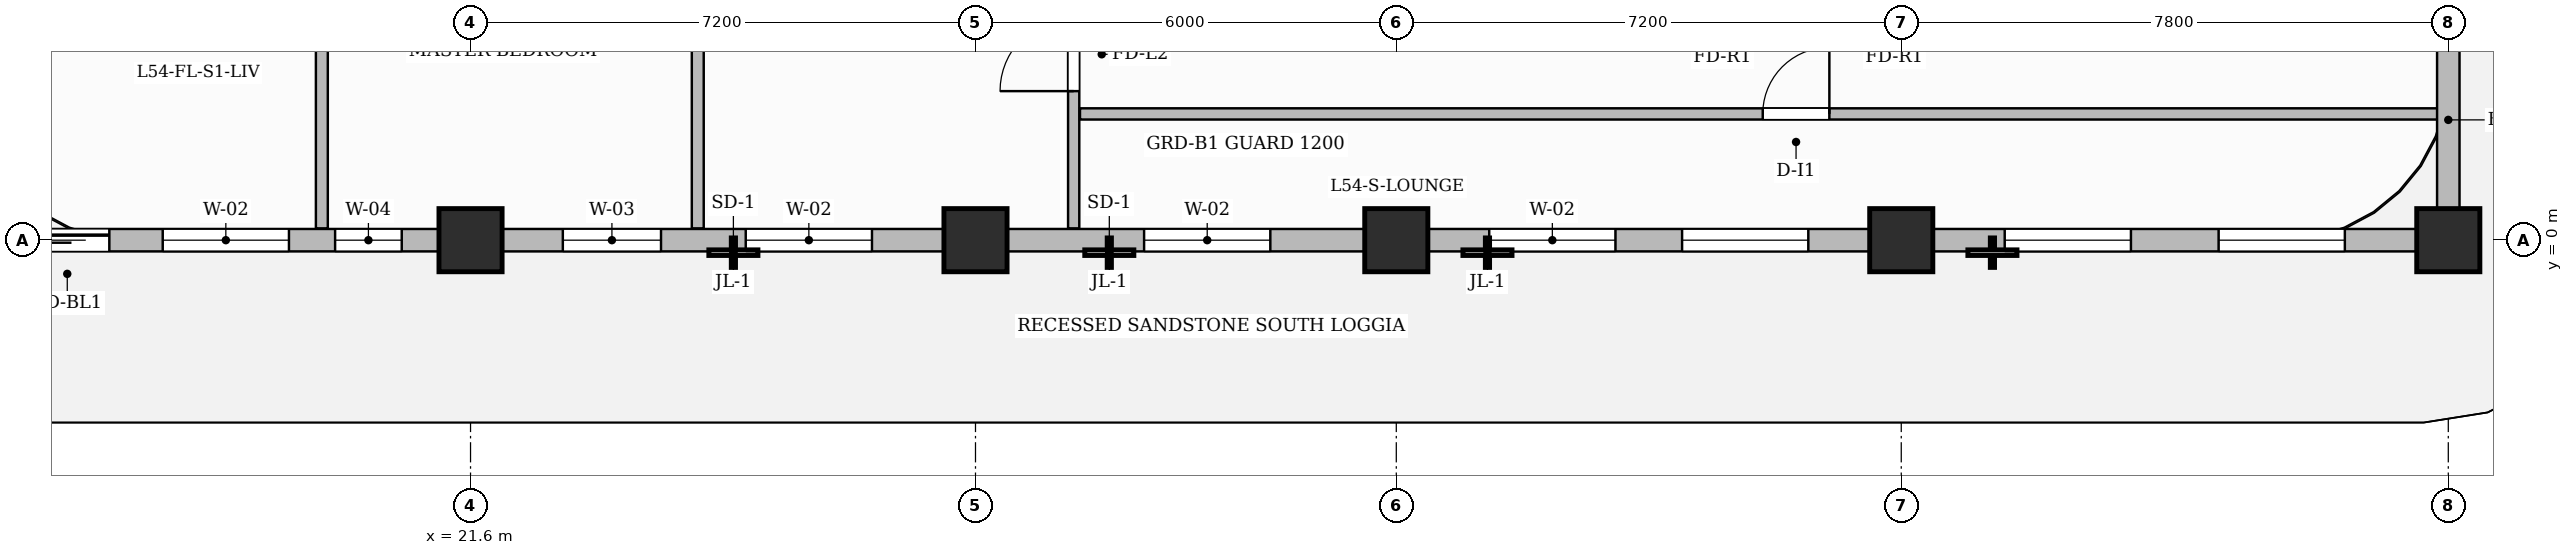
"""IFC4 building model, lengths in metres.
Left out: names, types, materials, properties, quantities, classifications, styles, units other than length and angle.
Written with IfcOpenShell. Run it as: python <this file> out.ifc"""

import sys

from ifc_helpers import new_model, si_unit, direction, frame, frame_2d, origin, origin_2d, place, context, subcontext, project, spatial, rectangle, extrude, source, transform, mapped, element, fill, save


model = new_model("IFC4")
c1 = context("Model", 3, precision=1e-05, world=origin(), true_north=direction((0.0, 1.0)))
c2 = subcontext(c1, "Body", "Model", "MODEL_VIEW")
j1 = project(units=[si_unit("LENGTHUNIT", "METRE"), si_unit("PLANEANGLEUNIT", "RADIAN")], contexts=[c1])
p1 = place(None, origin())
s1 = spatial("IfcSite", under=j1, at=p1, CompositionType="ELEMENT")
p2 = place(p1, origin())
s2 = spatial("IfcBuilding", under=s1, at=p2, CompositionType="ELEMENT")
p3 = place(p2, frame((0.0, 0.0, 217.3)))
s3 = spatial("IfcBuildingStorey", under=s2, at=p3, CompositionType="ELEMENT", Elevation=217.3)
m1 = source(origin(), c2, "Body", "SweptSolid", [
    extrude(rectangle(XDim=0.9, YDim=0.9, at=origin_2d()), origin(), (0.0, 0.0, 1.0), 3.85),
])
for number, where, z_axis, x_axis in (
    (1, (21.6, 0.0, 0.0), (0.0, 0.0, 1.0), (1.0, 0.0, 0.0)),
    (2, (28.8, 0.0, 0.0), (0.0, 0.0, 1.0), (1.0, 0.0, 0.0)),
    (3, (34.8, 0.0, 0.0), (0.0, 0.0, 1.0), (1.0, 0.0, 0.0)),
    (4, (42.0, 0.0, 0.0), (0.0, 0.0, 1.0), (1.0, 0.0, 0.0)),
    (5, (49.8, 0.0, 0.0), (0.0, 0.0, 1.0), (1.0, 0.0, 0.0)),
):
    element("IfcColumn", number, at=place(p3, frame(where, z_axis=z_axis, x_axis=x_axis)), inside=s3, PredefinedType="COLUMN", context=c2, shape_type="MappedRepresentation", body=[
        mapped(m1, transform((0.0, 0.0, 0.0), scale=1.0)),
    ])
p4 = place(p3, frame((30.2, 0.168, 0.0), z_axis=(0.0, 0.0, 1.0), x_axis=(0.0, 1.0, 0.0)))
e6 = element("IfcWall", 6, at=p4, inside=s3, PredefinedType="PARTITIONING", context=c2, shape_type="SweptSolid", body=[
    extrude(rectangle(XDim=8.892, YDim=0.16, at=frame_2d((4.446, 0.0))), origin(), (0.0, 0.0, 1.0), 3.6),
])
p5 = place(p4, frame((1.957, 0.0, 0.0)))
e7 = element("IfcOpeningElement", 7, at=p5, cuts=e6, PredefinedType="OPENING", context=c2, shape_type="SweptSolid", body=[
    extrude(rectangle(XDim=1.05, YDim=2.15, at=frame_2d((0.525, 1.075))), frame((0.0, 0.09, 0.0), z_axis=(0.0, -1.0, 0.0), x_axis=(1.0, 0.0, 0.0)), (0.0, 0.0, 1.0), 0.18),
])
p6 = place(p3, frame((30.29, 1.8, 0.0), z_axis=(0.0, 0.0, 1.0), x_axis=(1.0, 0.0, 0.0)))
e8 = element("IfcWall", 8, at=p6, inside=s3, PredefinedType="PARTITIONING", context=c2, shape_type="SweptSolid", body=[
    extrude(rectangle(XDim=19.37, YDim=0.16, at=frame_2d((9.685, 0.0))), origin(), (0.0, 0.0, 1.0), 3.6),
])
p7 = place(p6, frame((9.735, 0.0, 0.0)))
e9 = element("IfcOpeningElement", 9, at=p7, cuts=e8, PredefinedType="OPENING", context=c2, shape_type="SweptSolid", body=[
    extrude(rectangle(XDim=0.95, YDim=2.15, at=frame_2d((0.475, 1.075))), frame((0.0, 0.09, 0.0), z_axis=(0.0, -1.0, 0.0), x_axis=(1.0, 0.0, 0.0)), (0.0, 0.0, 1.0), 0.18),
])
p8 = place(p3, frame((19.48, 0.168, 0.0), z_axis=(0.0, 0.0, 1.0), x_axis=(0.0, 1.0, 0.0)))
e10 = element("IfcWall", 10, at=p8, inside=s3, PredefinedType="PARTITIONING", context=c2, shape_type="SweptSolid", body=[
    extrude(rectangle(XDim=8.892, YDim=0.17, at=frame_2d((4.446, 0.0))), origin(), (0.0, 0.0, 1.0), 3.6),
])
p9 = place(p8, frame((7.432, 0.0, 0.0)))
e11 = element("IfcOpeningElement", 11, at=p9, cuts=e10, PredefinedType="OPENING", context=c2, shape_type="SweptSolid", body=[
    extrude(rectangle(XDim=0.95, YDim=2.15, at=frame_2d((0.475, 1.075))), frame((0.0, 0.095, 0.0), z_axis=(0.0, -1.0, 0.0), x_axis=(1.0, 0.0, 0.0)), (0.0, 0.0, 1.0), 0.19),
])
p10 = place(p3, frame((24.84, 0.168, 0.0), z_axis=(0.0, 0.0, 1.0), x_axis=(0.0, 1.0, 0.0)))
e12 = element("IfcWall", 12, at=p10, inside=s3, PredefinedType="PARTITIONING", context=c2, shape_type="SweptSolid", body=[
    extrude(rectangle(XDim=6.742, YDim=0.17, at=frame_2d((3.371, 0.0))), origin(), (0.0, 0.0, 1.0), 3.6),
])
p11 = place(p3, frame((14.4, 0.0, 0.0), z_axis=(0.0, 0.0, 1.0), x_axis=(1.0, 0.0, 0.0)))
e13 = element("IfcWall", 13, at=p11, inside=s3, PredefinedType="SOLIDWALL", context=c2, shape_type="SweptSolid", body=[
    extrude(rectangle(XDim=35.4, YDim=0.32, at=frame_2d((17.7, 0.0))), origin(), (0.0, 0.0, 1.0), 3.135),
])
p12 = place(p11, frame((0.85, 0.0, 0.0)))
e14 = element("IfcOpeningElement", 14, at=p12, cuts=e13, PredefinedType="OPENING", context=c2, shape_type="SweptSolid", body=[
    extrude(rectangle(XDim=1.2, YDim=2.2, at=frame_2d((0.6, 1.1))), frame((0.0, 0.17, 0.0), z_axis=(0.0, -1.0, 0.0), x_axis=(1.0, 0.0, 0.0)), (0.0, 0.0, 1.0), 0.34),
])
p13 = place(p11, frame((2.811, 0.0, 0.8)))
e15 = element("IfcOpeningElement", 15, at=p13, cuts=e13, PredefinedType="OPENING", context=c2, shape_type="SweptSolid", body=[
    extrude(rectangle(XDim=1.8, YDim=1.85, at=frame_2d((0.9, 0.925))), frame((0.0, 0.17, 0.0), z_axis=(0.0, -1.0, 0.0), x_axis=(1.0, 0.0, 0.0)), (0.0, 0.0, 1.0), 0.34),
])
p14 = place(p11, frame((5.269, 0.0, 0.8)))
e16 = element("IfcOpeningElement", 16, at=p14, cuts=e13, PredefinedType="OPENING", context=c2, shape_type="SweptSolid", body=[
    extrude(rectangle(XDim=0.95, YDim=1.75, at=frame_2d((0.475, 0.875))), frame((0.0, 0.17, 0.0), z_axis=(0.0, -1.0, 0.0), x_axis=(1.0, 0.0, 0.0)), (0.0, 0.0, 1.0), 0.34),
])
p15 = place(p11, frame((8.516, 0.0, 0.8)))
e17 = element("IfcOpeningElement", 17, at=p15, cuts=e13, PredefinedType="OPENING", context=c2, shape_type="SweptSolid", body=[
    extrude(rectangle(XDim=1.4, YDim=1.85, at=frame_2d((0.7, 0.925))), frame((0.0, 0.17, 0.0), z_axis=(0.0, -1.0, 0.0), x_axis=(1.0, 0.0, 0.0)), (0.0, 0.0, 1.0), 0.34),
])
p16 = place(p11, frame((11.124, 0.0, 0.8)))
e18 = element("IfcOpeningElement", 18, at=p16, cuts=e13, PredefinedType="OPENING", context=c2, shape_type="SweptSolid", body=[
    extrude(rectangle(XDim=1.8, YDim=1.85, at=frame_2d((0.9, 0.925))), frame((0.0, 0.17, 0.0), z_axis=(0.0, -1.0, 0.0), x_axis=(1.0, 0.0, 0.0)), (0.0, 0.0, 1.0), 0.34),
])
p17 = place(p11, frame((16.804, 0.0, 0.8)))
e19 = element("IfcOpeningElement", 19, at=p17, cuts=e13, PredefinedType="OPENING", context=c2, shape_type="SweptSolid", body=[
    extrude(rectangle(XDim=1.8, YDim=1.85, at=frame_2d((0.9, 0.925))), frame((0.0, 0.17, 0.0), z_axis=(0.0, -1.0, 0.0), x_axis=(1.0, 0.0, 0.0)), (0.0, 0.0, 1.0), 0.34),
])
p18 = place(p11, frame((21.725, 0.0, 0.8)))
e20 = element("IfcOpeningElement", 20, at=p18, cuts=e13, PredefinedType="OPENING", context=c2, shape_type="SweptSolid", body=[
    extrude(rectangle(XDim=1.8, YDim=1.85, at=frame_2d((0.9, 0.925))), frame((0.0, 0.17, 0.0), z_axis=(0.0, -1.0, 0.0), x_axis=(1.0, 0.0, 0.0)), (0.0, 0.0, 1.0), 0.34),
])
p19 = place(p11, frame((24.475, 0.0, 0.8)))
e21 = element("IfcOpeningElement", 21, at=p19, cuts=e13, PredefinedType="OPENING", context=c2, shape_type="SweptSolid", body=[
    extrude(rectangle(XDim=1.8, YDim=1.85, at=frame_2d((0.9, 0.925))), frame((0.0, 0.17, 0.0), z_axis=(0.0, -1.0, 0.0), x_axis=(1.0, 0.0, 0.0)), (0.0, 0.0, 1.0), 0.34),
])
p20 = place(p11, frame((29.075, 0.0, 0.8)))
e22 = element("IfcOpeningElement", 22, at=p20, cuts=e13, PredefinedType="OPENING", context=c2, shape_type="SweptSolid", body=[
    extrude(rectangle(XDim=1.8, YDim=1.85, at=frame_2d((0.9, 0.925))), frame((0.0, 0.17, 0.0), z_axis=(0.0, -1.0, 0.0), x_axis=(1.0, 0.0, 0.0)), (0.0, 0.0, 1.0), 0.34),
])
p21 = place(p11, frame((32.125, 0.0, 0.8)))
e23 = element("IfcOpeningElement", 23, at=p21, cuts=e13, PredefinedType="OPENING", context=c2, shape_type="SweptSolid", body=[
    extrude(rectangle(XDim=1.8, YDim=1.85, at=frame_2d((0.9, 0.925))), frame((0.0, 0.17, 0.0), z_axis=(0.0, -1.0, 0.0), x_axis=(1.0, 0.0, 0.0)), (0.0, 0.0, 1.0), 0.34),
])
p22 = place(p3, frame((49.8, 0.05, 0.0), z_axis=(0.0, 0.0, 1.0), x_axis=(0.0, 1.0, 0.0)))
e24 = element("IfcWall", 24, at=p22, inside=s3, PredefinedType="SOLIDWALL", context=c2, shape_type="SweptSolid", body=[
    extrude(rectangle(XDim=3.33, YDim=0.32, at=frame_2d((1.665, 0.0))), origin(), (0.0, 0.0, 1.0), 3.6),
])
m2 = source(origin(), c2, "Body", "SweptSolid", [
    extrude(rectangle(XDim=1.05, YDim=2.15, at=frame_2d((0.525, 1.075))), frame((0.0, 0.025, 0.0), z_axis=(0.0, -1.0, 0.0), x_axis=(1.0, 0.0, 0.0)), (0.0, 0.0, 1.0), 0.05),
])
p23 = place(p5, origin())
e25 = element("IfcDoor", 25, at=p23, inside=s3, OperationType="SINGLE_SWING_LEFT", PredefinedType="DOOR", context=c2, shape_type="MappedRepresentation", body=[
    mapped(m2, transform((0.0, 0.0, 0.0), scale=1.0)),
])
fill(e7, e25)
m3 = source(origin(), c2, "Body", "SweptSolid", [
    extrude(rectangle(XDim=0.95, YDim=2.15, at=frame_2d((0.475, 1.075))), frame((0.0, 0.025, 0.0), z_axis=(0.0, -1.0, 0.0), x_axis=(1.0, 0.0, 0.0)), (0.0, 0.0, 1.0), 0.05),
])
p24 = place(p7, origin())
e26 = element("IfcDoor", 26, at=p24, inside=s3, OperationType="SINGLE_SWING_RIGHT", PredefinedType="DOOR", context=c2, shape_type="MappedRepresentation", body=[
    mapped(m3, transform((0.0, 0.0, 0.0), scale=1.0)),
])
fill(e9, e26)
m4 = source(origin(), c2, "Body", "SweptSolid", [
    extrude(rectangle(XDim=1.2, YDim=2.2, at=frame_2d((0.6, 1.1))), frame((0.0, 0.025, 0.0), z_axis=(0.0, -1.0, 0.0), x_axis=(1.0, 0.0, 0.0)), (0.0, 0.0, 1.0), 0.05),
])
p25 = place(p12, origin())
e27 = element("IfcDoor", 27, at=p25, inside=s3, OperationType="SLIDING_TO_LEFT", PredefinedType="DOOR", context=c2, shape_type="MappedRepresentation", body=[
    mapped(m4, transform((0.0, 0.0, 0.0), scale=1.0)),
])
fill(e14, e27)
m5 = source(origin(), c2, "Body", "SweptSolid", [
    extrude(rectangle(XDim=1.8, YDim=1.85, at=frame_2d((0.9, 0.925))), frame((0.0, 0.03, 0.0), z_axis=(0.0, -1.0, 0.0), x_axis=(1.0, 0.0, 0.0)), (0.0, 0.0, 1.0), 0.06),
])
p26 = place(p13, origin())
e28 = element("IfcWindow", 28, at=p26, inside=s3, PartitioningType="DOUBLE_PANEL_VERTICAL", PredefinedType="WINDOW", context=c2, shape_type="MappedRepresentation", body=[
    mapped(m5, transform((0.0, 0.0, 0.0), scale=1.0)),
])
fill(e15, e28)
m6 = source(origin(), c2, "Body", "SweptSolid", [
    extrude(rectangle(XDim=0.95, YDim=1.75, at=frame_2d((0.475, 0.875))), frame((0.0, 0.03, 0.0), z_axis=(0.0, -1.0, 0.0), x_axis=(1.0, 0.0, 0.0)), (0.0, 0.0, 1.0), 0.06),
])
p27 = place(p14, origin())
e29 = element("IfcWindow", 29, at=p27, inside=s3, PartitioningType="SINGLE_PANEL", PredefinedType="WINDOW", context=c2, shape_type="MappedRepresentation", body=[
    mapped(m6, transform((0.0, 0.0, 0.0), scale=1.0)),
])
fill(e16, e29)
m7 = source(origin(), c2, "Body", "SweptSolid", [
    extrude(rectangle(XDim=1.4, YDim=1.85, at=frame_2d((0.7, 0.925))), frame((0.0, 0.03, 0.0), z_axis=(0.0, -1.0, 0.0), x_axis=(1.0, 0.0, 0.0)), (0.0, 0.0, 1.0), 0.06),
])
p28 = place(p15, origin())
e30 = element("IfcWindow", 30, at=p28, inside=s3, PartitioningType="SINGLE_PANEL", PredefinedType="WINDOW", context=c2, shape_type="MappedRepresentation", body=[
    mapped(m7, transform((0.0, 0.0, 0.0), scale=1.0)),
])
fill(e17, e30)
p29 = place(p16, origin())
e31 = element("IfcWindow", 31, at=p29, inside=s3, PartitioningType="DOUBLE_PANEL_VERTICAL", PredefinedType="WINDOW", context=c2, shape_type="MappedRepresentation", body=[
    mapped(m5, transform((0.0, 0.0, 0.0), scale=1.0)),
])
fill(e18, e31)
p30 = place(p17, origin())
e32 = element("IfcWindow", 32, at=p30, inside=s3, PartitioningType="DOUBLE_PANEL_VERTICAL", PredefinedType="WINDOW", context=c2, shape_type="MappedRepresentation", body=[
    mapped(m5, transform((0.0, 0.0, 0.0), scale=1.0)),
])
fill(e19, e32)
p31 = place(p18, origin())
e33 = element("IfcWindow", 33, at=p31, inside=s3, PartitioningType="DOUBLE_PANEL_VERTICAL", PredefinedType="WINDOW", context=c2, shape_type="MappedRepresentation", body=[
    mapped(m5, transform((0.0, 0.0, 0.0), scale=1.0)),
])
fill(e20, e33)
p32 = place(p19, origin())
e34 = element("IfcWindow", 34, at=p32, inside=s3, PartitioningType="DOUBLE_PANEL_VERTICAL", PredefinedType="WINDOW", context=c2, shape_type="MappedRepresentation", body=[
    mapped(m5, transform((0.0, 0.0, 0.0), scale=1.0)),
])
fill(e21, e34)
p33 = place(p20, origin())
e35 = element("IfcWindow", 35, at=p33, inside=s3, PartitioningType="DOUBLE_PANEL_VERTICAL", PredefinedType="WINDOW", context=c2, shape_type="MappedRepresentation", body=[
    mapped(m5, transform((0.0, 0.0, 0.0), scale=1.0)),
])
fill(e22, e35)
p34 = place(p21, origin())
e36 = element("IfcWindow", 36, at=p34, inside=s3, PartitioningType="DOUBLE_PANEL_VERTICAL", PredefinedType="WINDOW", context=c2, shape_type="MappedRepresentation", body=[
    mapped(m5, transform((0.0, 0.0, 0.0), scale=1.0)),
])
fill(e23, e36)
save(model, sys.argv[1])
